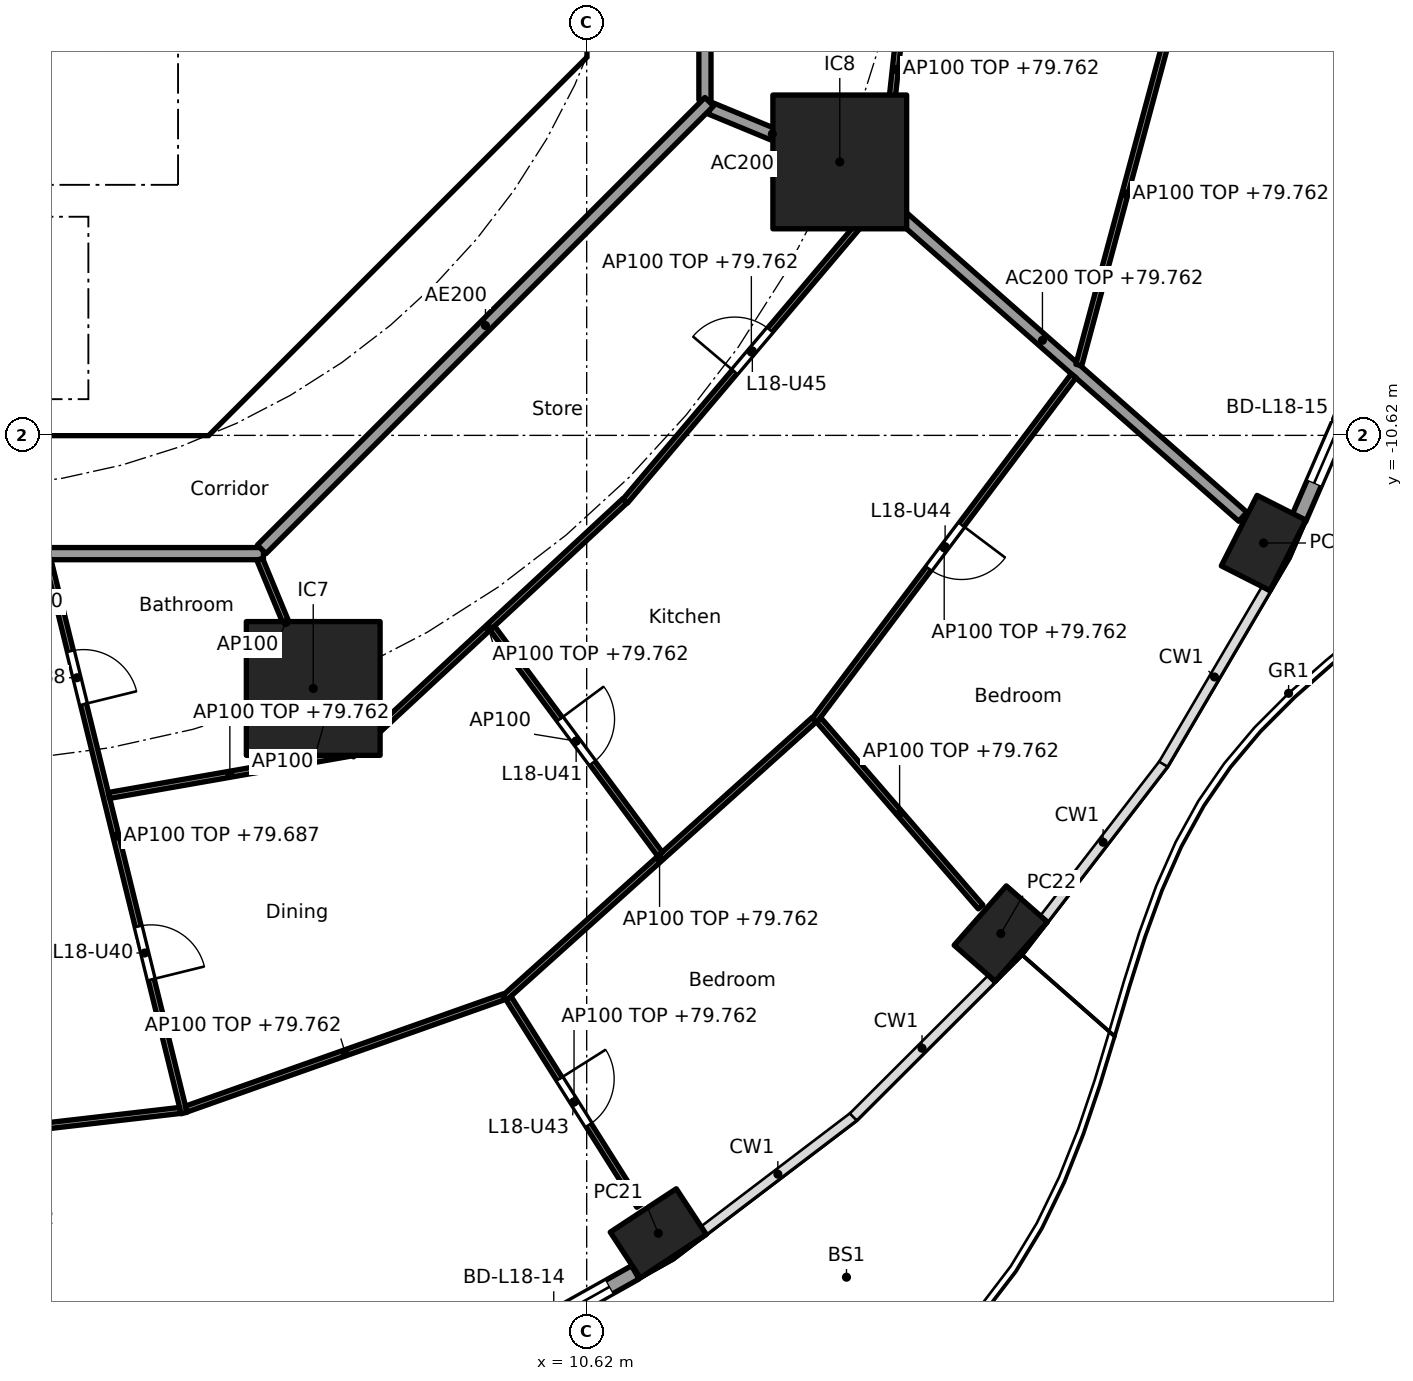
"""IFC4 building model, lengths in metres.
Left out: names, types, materials, properties, quantities, classifications, styles, units other than length and angle.
Written with IfcOpenShell. Run it as: python <this file> out.ifc"""

import sys

from ifc_helpers import new_model, si_unit, direction, frame, frame_2d, origin, origin_2d, place, context, subcontext, project, spatial, polyline, rectangle, hollow_rectangle, outline, extrude, element, fill, save


model = new_model("IFC4")
c1 = context("Model", 3, precision=1e-05, world=origin(), true_north=direction((0.0, 1.0)))
c2 = subcontext(c1, "Body", "Model", "MODEL_VIEW")
j1 = project(units=[si_unit("LENGTHUNIT", "METRE"), si_unit("PLANEANGLEUNIT", "RADIAN")], contexts=[c1])
p1 = place(None, origin())
s1 = spatial("IfcSite", under=j1, at=p1, CompositionType="ELEMENT")
p2 = place(p1, origin())
s2 = spatial("IfcBuilding", under=s1, at=p2, CompositionType="ELEMENT")
p3 = place(p2, frame((0.0, 0.0, 77.0)))
s3 = spatial("IfcBuildingStorey", under=s2, at=p3, CompositionType="ELEMENT", Elevation=77.0)
for number, where, z_axis, x_axis in (
    (1, (11.798, -23.742, 0.0), (0.0, 0.0, 1.0), (0.836, 0.549, 0.0)),
    (2, (17.43, -18.813, 0.0), (0.0, 0.0, 1.0), (0.66, 0.751, 0.0)),
    (3, (21.751, -12.39, 0.0), (0.0, 0.0, 1.0), (0.452, 0.892, 0.0)),
):
    element("IfcColumn", number, at=place(p3, frame(where, z_axis=z_axis, x_axis=x_axis)), inside=s3, PredefinedType="COLUMN", context=c2, shape_type="SweptSolid", body=[
        extrude(hollow_rectangle(XDim=1.3, YDim=0.9, WallThickness=0.045, at=origin_2d()), origin(), (0.0, 0.0, 1.0), 3.7),
    ])
for number, where, z_axis, x_axis in (
    (4, (6.123, -14.782, 0.0), (0.0, 0.0, 1.0), (1.0, 0.0, 0.0)),
    (5, (14.782, -6.123, 0.0), (0.0, 0.0, 1.0), (1.0, 0.0, 0.0)),
):
    element("IfcColumn", number, at=place(p3, frame(where, z_axis=z_axis, x_axis=x_axis)), inside=s3, PredefinedType="COLUMN", context=c2, shape_type="SweptSolid", body=[
        extrude(rectangle(XDim=2.2, YDim=2.2, at=origin_2d()), origin(), (0.0, 0.0, 1.0), 3.7),
    ])
p4 = place(p3, frame((11.419, -24.384, 0.0), z_axis=(0.0, 0.0, 1.0), x_axis=(-0.872071158476, -0.489379090843, 0.0)))
e6 = element("IfcWall", 6, at=p4, inside=s3, PredefinedType="SOLIDWALL", context=c2, shape_type="SweptSolid", body=[
    extrude(rectangle(XDim=3.076, YDim=0.25, at=frame_2d((1.538, 0.0))), origin(), (0.0, 0.0, 1.0), 3.44),
])
p5 = place(p4, frame((0.488, 0.0, 0.0)))
e7 = element("IfcOpeningElement", 7, at=p5, cuts=e6, PredefinedType="OPENING", context=c2, shape_type="SweptSolid", body=[
    extrude(rectangle(XDim=2.1, YDim=2.4, at=frame_2d((1.05, 1.2))), frame((0.0, 0.135, 0.0), z_axis=(0.0, -1.0, 0.0), x_axis=(1.0, 0.0, 0.0)), (0.0, 0.0, 1.0), 0.27),
])
p6 = place(p3, frame((23.672, -8.893, 0.0), z_axis=(0.0, 0.0, 1.0), x_axis=(-0.397621629246, -0.917549475481, 0.0)))
e8 = element("IfcWall", 8, at=p6, inside=s3, PredefinedType="SOLIDWALL", context=c2, shape_type="SweptSolid", body=[
    extrude(rectangle(XDim=3.379, YDim=0.25, at=frame_2d((1.69, 0.0))), origin(), (0.0, 0.0, 1.0), 3.44),
])
p7 = place(p6, frame((0.64, 0.0, 0.0)))
e9 = element("IfcOpeningElement", 9, at=p7, cuts=e8, PredefinedType="OPENING", context=c2, shape_type="SweptSolid", body=[
    extrude(rectangle(XDim=2.1, YDim=2.4, at=frame_2d((1.05, 1.2))), frame((0.0, 0.135, 0.0), z_axis=(0.0, -1.0, 0.0), x_axis=(1.0, 0.0, 0.0)), (0.0, 0.0, 1.0), 0.27),
])
p8 = place(p3, frame((4.613, -9.988, 0.0), z_axis=(0.0, 0.0, 1.0), x_axis=(0.707106781187, 0.707106781187, 0.0)))
e10 = element("IfcWall", 10, at=p8, inside=s3, PredefinedType="SHEAR", context=c2, shape_type="SweptSolid", body=[
    extrude(rectangle(XDim=7.602, YDim=0.6, at=frame_2d((3.801, 0.0))), origin(), (0.0, 0.0, 1.0), 3.44),
])
p9 = place(p8, frame((3.201, 0.0, 0.0)))
e11 = element("IfcOpeningElement", 11, at=p9, cuts=e10, PredefinedType="OPENING", context=c2, shape_type="SweptSolid", body=[
    extrude(rectangle(XDim=1.2, YDim=2.1, at=frame_2d((0.6, 1.05))), frame((0.0, 0.31, 0.0), z_axis=(0.0, -1.0, 0.0), x_axis=(1.0, 0.0, 0.0)), (0.0, 0.0, 1.0), 0.62),
])
p10 = place(p3, frame((4.0, -10.025, 0.0), z_axis=(0.0, 0.0, 1.0), x_axis=(0.0, 1.0, 0.0)))
e12 = element("IfcWall", 12, at=p10, inside=s3, PredefinedType="SOLIDWALL", context=c2, shape_type="SweptSolid", body=[
    extrude(rectangle(XDim=3.0, YDim=0.2, at=frame_2d((1.5, 0.0))), origin(), (0.0, 0.0, 1.0), 3.44),
])
p11 = place(p10, frame((0.975, 0.0, 0.0)))
e13 = element("IfcOpeningElement", 13, at=p11, cuts=e12, PredefinedType="OPENING", context=c2, shape_type="SweptSolid", body=[
    extrude(rectangle(XDim=1.1, YDim=2.1, at=frame_2d((0.55, 1.05))), frame((0.0, 0.11, 0.0), z_axis=(0.0, -1.0, 0.0), x_axis=(1.0, 0.0, 0.0)), (0.0, 0.0, 1.0), 0.22),
])
p12 = place(p3, frame((4.0, -6.5, 0.0), z_axis=(0.0, 0.0, 1.0), x_axis=(0.0, 1.0, 0.0)))
e14 = element("IfcWall", 14, at=p12, inside=s3, PredefinedType="SOLIDWALL", context=c2, shape_type="SweptSolid", body=[
    extrude(rectangle(XDim=2.2, YDim=0.2, at=frame_2d((1.1, 0.0))), origin(), (0.0, 0.0, 1.0), 3.44),
])
p13 = place(p12, frame((0.55, 0.0, 0.0)))
e15 = element("IfcOpeningElement", 15, at=p13, cuts=e14, PredefinedType="OPENING", context=c2, shape_type="SweptSolid", body=[
    extrude(rectangle(XDim=1.1, YDim=2.1, at=frame_2d((0.55, 1.05))), frame((0.0, 0.11, 0.0), z_axis=(0.0, -1.0, 0.0), x_axis=(1.0, 0.0, 0.0)), (0.0, 0.0, 1.0), 0.22),
])
p14 = place(p3, origin())
e16 = element("IfcWall", 16, at=p14, inside=s3, PredefinedType="SHEAR", context=c2, shape_type="SweptSolid", body=[
    extrude(outline(polyline([(-4.152, -10.025), (4.152, -10.025), (4.401, -9.776), (4.825, -10.2), (4.401, -10.625), (-4.401, -10.625), (-4.825, -10.2), (-4.401, -9.776), (-4.152, -10.025)])), origin(), (0.0, 0.0, 1.0), 3.44),
])
p15 = place(p3, origin())
e17 = element("IfcWall", 17, at=p15, inside=s3, PredefinedType="SHEAR", context=c2, shape_type="SweptSolid", body=[
    extrude(outline(polyline([(9.776, -4.401), (10.025, -4.152), (10.025, -3.801), (10.025, 4.152), (9.776, 4.401), (10.2, 4.825), (10.625, 4.401), (10.625, -4.401), (10.2, -4.825), (9.776, -4.401)])), origin(), (0.0, 0.0, 1.0), 3.44),
])
p16 = place(p3, origin())
e18 = element("IfcWall", 18, at=p16, inside=s3, PredefinedType="SOLIDWALL", context=c2, shape_type="SweptSolid", body=[
    extrude(outline(polyline([(4.1, -7.025), (-4.1, -7.025), (-4.1, -6.5), (4.1, -6.5), (4.1, -7.025)])), origin(), (0.0, 0.0, 1.0), 3.44),
])
p17 = place(p3, frame((12.657, -5.243, 0.0), z_axis=(0.0, 0.0, 1.0), x_axis=(0.923876145736, -0.382691608661, 0.0)))
e19 = element("IfcWall", 19, at=p17, inside=s3, PredefinedType="PARTITIONING", context=c2, shape_type="SweptSolid", body=[
    extrude(rectangle(XDim=2.2, YDim=0.2, at=frame_2d((1.1, 0.0))), origin(), (0.0, 0.0, 1.0), 3.44),
])
p18 = place(p3, frame((14.82, -6.156, 0.0), z_axis=(0.0, 0.0, 1.0), x_axis=(0.750582231659, -0.660777052808, 0.0)))
e20 = element("IfcWall", 20, at=p18, inside=s3, PredefinedType="PARTITIONING", context=c2, shape_type="SweptSolid", body=[
    extrude(rectangle(XDim=8.781, YDim=0.2, at=frame_2d((4.391, 0.0))), origin(), (0.0, 0.0, 1.0), 2.762),
])
p19 = place(p3, frame((12.565, -5.104, 0.0), z_axis=(0.0, 0.0, 1.0), x_axis=(0.0, 1.0, 0.0)))
e21 = element("IfcWall", 21, at=p19, inside=s3, PredefinedType="PARTITIONING", context=c2, shape_type="SweptSolid", body=[
    extrude(rectangle(XDim=10.209, YDim=0.2, at=frame_2d((5.104, 0.0))), origin(), (0.0, 0.0, 1.0), 3.44),
])
p20 = place(p19, frame((6.339, 0.0, 0.0)))
e22 = element("IfcOpeningElement", 22, at=p20, cuts=e21, PredefinedType="OPENING", context=c2, shape_type="SweptSolid", body=[
    extrude(rectangle(XDim=1.0, YDim=2.1, at=frame_2d((0.5, 1.05))), frame((0.0, 0.11, 0.0), z_axis=(0.0, -1.0, 0.0), x_axis=(1.0, 0.0, 0.0)), (0.0, 0.0, 1.0), 0.22),
])
p21 = place(p3, frame((-5.104, -12.565, 0.0), z_axis=(0.0, 0.0, 1.0), x_axis=(1.0, 0.0, 0.0)))
e23 = element("IfcWall", 23, at=p21, inside=s3, PredefinedType="PARTITIONING", context=c2, shape_type="SweptSolid", body=[
    extrude(rectangle(XDim=10.409, YDim=0.2, at=frame_2d((5.205, 0.0))), origin(), (0.0, 0.0, 1.0), 3.44),
])
p22 = place(p21, frame((4.604, 0.0, 0.0)))
e24 = element("IfcOpeningElement", 24, at=p22, cuts=e23, PredefinedType="OPENING", context=c2, shape_type="SweptSolid", body=[
    extrude(rectangle(XDim=1.0, YDim=2.1, at=frame_2d((0.5, 1.05))), frame((0.0, 0.11, 0.0), z_axis=(0.0, -1.0, 0.0), x_axis=(1.0, 0.0, 0.0)), (0.0, 0.0, 1.0), 0.22),
])
p23 = place(p3, frame((5.275, -12.494, 0.0), z_axis=(0.0, 0.0, 1.0), x_axis=(0.707106781187, 0.707106781187, 0.0)))
e25 = element("IfcWall", 25, at=p23, inside=s3, PredefinedType="PARTITIONING", context=c2, shape_type="SweptSolid", body=[
    extrude(rectangle(XDim=10.409, YDim=0.2, at=frame_2d((5.205, 0.0))), origin(), (0.0, 0.0, 1.0), 3.44),
])
p24 = place(p3, frame((-1.726, -22.375, 0.0), z_axis=(0.0, 0.0, 1.0), x_axis=(0.99339223329, 0.114768771187, 0.0)))
e26 = element("IfcWall", 26, at=p24, inside=s3, PredefinedType="PARTITIONING", context=c2, shape_type="SweptSolid", body=[
    extrude(rectangle(XDim=5.701, YDim=0.1, at=frame_2d((2.851, 0.0))), origin(), (0.0, 0.0, 1.0), 2.762),
])
p25 = place(p24, frame((2.4, 0.0, 0.0)))
e27 = element("IfcOpeningElement", 27, at=p25, cuts=e26, PredefinedType="OPENING", context=c2, shape_type="SweptSolid", body=[
    extrude(rectangle(XDim=0.9, YDim=2.1, at=frame_2d((0.45, 1.05))), frame((0.0, 0.06, 0.0), z_axis=(0.0, -1.0, 0.0), x_axis=(1.0, 0.0, 0.0)), (0.0, 0.0, 1.0), 0.12),
])
p26 = place(p3, frame((1.759, -12.662, 0.0), z_axis=(0.0, 0.0, 1.0), x_axis=(0.239022447434, -0.971014041929, 0.0)))
e28 = element("IfcWall", 28, at=p26, inside=s3, PredefinedType="PARTITIONING", context=c2, shape_type="SweptSolid", body=[
    extrude(rectangle(XDim=9.374, YDim=0.1, at=frame_2d((4.687, 0.0))), origin(), (0.0, 0.0, 1.0), 2.687),
])
p27 = place(p26, frame((1.552, 0.0, 0.0)))
e29 = element("IfcOpeningElement", 29, at=p27, cuts=e28, PredefinedType="OPENING", context=c2, shape_type="SweptSolid", body=[
    extrude(rectangle(XDim=0.9, YDim=2.1, at=frame_2d((0.45, 1.05))), frame((0.0, 0.06, 0.0), z_axis=(0.0, -1.0, 0.0), x_axis=(1.0, 0.0, 0.0)), (0.0, 0.0, 1.0), 0.12),
])
p28 = place(p26, frame((6.214, 0.0, 0.0)))
e30 = element("IfcOpeningElement", 30, at=p28, cuts=e28, PredefinedType="OPENING", context=c2, shape_type="SweptSolid", body=[
    extrude(rectangle(XDim=0.9, YDim=2.1, at=frame_2d((0.45, 1.05))), frame((0.0, 0.06, 0.0), z_axis=(0.0, -1.0, 0.0), x_axis=(1.0, 0.0, 0.0)), (0.0, 0.0, 1.0), 0.12),
])
p29 = place(p3, frame((2.765, -16.541, 0.0), z_axis=(0.0, 0.0, 1.0), x_axis=(0.985002709003, 0.172538874623, 0.0)))
e31 = element("IfcWall", 31, at=p29, inside=s3, PredefinedType="PARTITIONING", context=c2, shape_type="SweptSolid", body=[
    extrude(rectangle(XDim=4.034, YDim=0.1, at=frame_2d((2.017, 0.0))), origin(), (0.0, 0.0, 1.0), 2.762),
])
p30 = place(p3, frame((4.034, -21.698, 0.0), z_axis=(0.0, 0.0, 1.0), x_axis=(0.942864271692, 0.333177077794, 0.0)))
e32 = element("IfcWall", 32, at=p30, inside=s3, PredefinedType="PARTITIONING", context=c2, shape_type="SweptSolid", body=[
    extrude(rectangle(XDim=5.545, YDim=0.1, at=frame_2d((2.772, 0.0))), origin(), (0.0, 0.0, 1.0), 2.762),
])
p31 = place(p3, frame((5.243, -12.657, 0.0), z_axis=(0.0, 0.0, 1.0), x_axis=(0.382719158442, -0.923864733477, 0.0)))
e33 = element("IfcWall", 33, at=p31, inside=s3, PredefinedType="PARTITIONING", context=c2, shape_type="SweptSolid", body=[
    extrude(rectangle(XDim=2.25, YDim=0.1, at=frame_2d((1.125, 0.0))), origin(), (0.0, 0.0, 1.0), 3.44),
])
p32 = place(p3, frame((6.751, -15.87, 0.0), z_axis=(0.0, 0.0, 1.0), x_axis=(0.733003105791, 0.680225291283, 0.0)))
e34 = element("IfcWall", 34, at=p32, inside=s3, PredefinedType="PARTITIONING", context=c2, shape_type="SweptSolid", body=[
    extrude(rectangle(XDim=6.138, YDim=0.1, at=frame_2d((3.069, 0.0))), origin(), (0.0, 0.0, 1.0), 2.762),
])
p33 = place(p3, frame((9.336, -19.877, 0.0), z_axis=(0.0, 0.0, 1.0), x_axis=(0.533525984139, -0.845783674617, 0.0)))
e35 = element("IfcWall", 35, at=p33, inside=s3, PredefinedType="PARTITIONING", context=c2, shape_type="SweptSolid", body=[
    extrude(rectangle(XDim=4.033, YDim=0.1, at=frame_2d((2.016, 0.0))), origin(), (0.0, 0.0, 1.0), 2.762),
])
p34 = place(p33, frame((1.566, 0.0, 0.0)))
e36 = element("IfcOpeningElement", 36, at=p34, cuts=e35, PredefinedType="OPENING", context=c2, shape_type="SweptSolid", body=[
    extrude(rectangle(XDim=0.9, YDim=2.1, at=frame_2d((0.45, 1.05))), frame((0.0, 0.06, 0.0), z_axis=(0.0, -1.0, 0.0), x_axis=(1.0, 0.0, 0.0)), (0.0, 0.0, 1.0), 0.12),
])
p35 = place(p3, frame((9.272, -19.868, 0.0), z_axis=(0.0, 0.0, 1.0), x_axis=(0.743884413566, 0.668308296562, 0.0)))
e37 = element("IfcWall", 37, at=p35, inside=s3, PredefinedType="PARTITIONING", context=c2, shape_type="SweptSolid", body=[
    extrude(rectangle(XDim=6.845, YDim=0.1, at=frame_2d((3.423, 0.0))), origin(), (0.0, 0.0, 1.0), 2.762),
])
p36 = place(p3, frame((9.067, -13.789, 0.0), z_axis=(0.0, 0.0, 1.0), x_axis=(0.5958491185, -0.80309640018, 0.0)))
e38 = element("IfcWall", 38, at=p36, inside=s3, PredefinedType="PARTITIONING", context=c2, shape_type="SweptSolid", body=[
    extrude(rectangle(XDim=4.63, YDim=0.1, at=frame_2d((2.315, 0.0))), origin(), (0.0, 0.0, 1.0), 3.44),
])
p37 = place(p36, frame((1.865, 0.0, 0.0)))
e39 = element("IfcOpeningElement", 39, at=p37, cuts=e38, PredefinedType="OPENING", context=c2, shape_type="SweptSolid", body=[
    extrude(rectangle(XDim=0.9, YDim=2.1, at=frame_2d((0.45, 1.05))), frame((0.0, 0.06, 0.0), z_axis=(0.0, -1.0, 0.0), x_axis=(1.0, 0.0, 0.0)), (0.0, 0.0, 1.0), 0.12),
])
p38 = place(p3, frame((11.255, -11.699, 0.0), z_axis=(0.0, 0.0, 1.0), x_axis=(0.646107653745, 0.763246290375, 0.0)))
e40 = element("IfcWall", 40, at=p38, inside=s3, PredefinedType="PARTITIONING", context=c2, shape_type="SweptSolid", body=[
    extrude(rectangle(XDim=6.417, YDim=0.1, at=frame_2d((3.208, 0.0))), origin(), (0.0, 0.0, 1.0), 2.762),
])
p39 = place(p38, frame((2.784, 0.0, 0.0)))
e41 = element("IfcOpeningElement", 41, at=p39, cuts=e40, PredefinedType="OPENING", context=c2, shape_type="SweptSolid", body=[
    extrude(rectangle(XDim=0.9, YDim=2.1, at=frame_2d((0.45, 1.05))), frame((0.0, 0.06, 0.0), z_axis=(0.0, -1.0, 0.0), x_axis=(1.0, 0.0, 0.0)), (0.0, 0.0, 1.0), 0.12),
])
p40 = place(p3, frame((14.435, -15.297, 0.0), z_axis=(0.0, 0.0, 1.0), x_axis=(0.654405107766, -0.756144136345, 0.0)))
e42 = element("IfcWall", 42, at=p40, inside=s3, PredefinedType="PARTITIONING", context=c2, shape_type="SweptSolid", body=[
    extrude(rectangle(XDim=4.07, YDim=0.1, at=frame_2d((2.035, 0.0))), origin(), (0.0, 0.0, 1.0), 2.762),
])
p41 = place(p3, frame((14.372, -15.3, 0.0), z_axis=(0.0, 0.0, 1.0), x_axis=(0.600987107857, 0.79925871668, 0.0)))
e43 = element("IfcWall", 43, at=p41, inside=s3, PredefinedType="PARTITIONING", context=c2, shape_type="SweptSolid", body=[
    extrude(rectangle(XDim=7.08, YDim=0.1, at=frame_2d((3.54, 0.0))), origin(), (0.0, 0.0, 1.0), 2.762),
])
p42 = place(p41, frame((3.115, 0.0, 0.0)))
e44 = element("IfcOpeningElement", 44, at=p42, cuts=e43, PredefinedType="OPENING", context=c2, shape_type="SweptSolid", body=[
    extrude(rectangle(XDim=0.9, YDim=2.1, at=frame_2d((0.45, 1.05))), frame((0.0, 0.06, 0.0), z_axis=(0.0, -1.0, 0.0), x_axis=(1.0, 0.0, 0.0)), (0.0, 0.0, 1.0), 0.12),
])
p43 = place(p3, frame((15.477, -6.625, 0.0), z_axis=(0.0, 0.0, 1.0), x_axis=(0.107561928907, 0.994198386365, 0.0)))
e45 = element("IfcWall", 45, at=p43, inside=s3, PredefinedType="PARTITIONING", context=c2, shape_type="SweptSolid", body=[
    extrude(rectangle(XDim=4.072, YDim=0.1, at=frame_2d((2.036, 0.0))), origin(), (0.0, 0.0, 1.0), 2.762),
])
p44 = place(p3, frame((18.713, -9.464, 0.0), z_axis=(0.0, 0.0, 1.0), x_axis=(0.260279646259, 0.965533275316, 0.0)))
e46 = element("IfcWall", 46, at=p44, inside=s3, PredefinedType="PARTITIONING", context=c2, shape_type="SweptSolid", body=[
    extrude(rectangle(XDim=5.833, YDim=0.1, at=frame_2d((2.917, 0.0))), origin(), (0.0, 0.0, 1.0), 2.762),
])
p45 = place(p3, frame((6.051, -14.855, 0.0), z_axis=(0.0, 0.0, 1.0), x_axis=(0.533542828537, -0.845773048824, 0.0)))
e47 = element("IfcWall", 47, at=p45, inside=s3, PredefinedType="PARTITIONING", context=c2, shape_type="SweptSolid", body=[
    extrude(rectangle(XDim=1.021, YDim=0.1, at=frame_2d((0.51, 0.0))), origin(), (0.0, 0.0, 1.0), 3.44),
])
p46 = place(p5, origin())
e48 = element("IfcDoor", 48, at=p46, inside=s3, OperationType="SLIDING_TO_LEFT", PredefinedType="DOOR", context=c2, shape_type="SweptSolid", body=[
    extrude(rectangle(XDim=2.1, YDim=2.4, at=frame_2d((1.05, 1.2))), frame((0.0, 0.025, 0.0), z_axis=(0.0, -1.0, 0.0), x_axis=(1.0, 0.0, 0.0)), (0.0, 0.0, 1.0), 0.05),
])
fill(e7, e48)
p47 = place(p7, origin())
e49 = element("IfcDoor", 49, at=p47, inside=s3, OperationType="SLIDING_TO_LEFT", PredefinedType="DOOR", context=c2, shape_type="SweptSolid", body=[
    extrude(rectangle(XDim=2.1, YDim=2.4, at=frame_2d((1.05, 1.2))), frame((0.0, 0.025, 0.0), z_axis=(0.0, -1.0, 0.0), x_axis=(1.0, 0.0, 0.0)), (0.0, 0.0, 1.0), 0.05),
])
fill(e9, e49)
p48 = place(p13, origin())
e50 = element("IfcDoor", 50, at=p48, inside=s3, OperationType="DOUBLE_DOOR_SLIDING", PredefinedType="DOOR", context=c2, shape_type="SweptSolid", body=[
    extrude(rectangle(XDim=1.1, YDim=2.1, at=frame_2d((0.55, 1.05))), frame((0.0, 0.025, 0.0), z_axis=(0.0, -1.0, 0.0), x_axis=(1.0, 0.0, 0.0)), (0.0, 0.0, 1.0), 0.05),
])
fill(e15, e50)
p49 = place(p11, origin())
e51 = element("IfcDoor", 51, at=p49, inside=s3, OperationType="SINGLE_SWING_LEFT", PredefinedType="DOOR", context=c2, shape_type="SweptSolid", body=[
    extrude(rectangle(XDim=1.1, YDim=2.1, at=frame_2d((0.55, 1.05))), frame((0.0, 0.025, 0.0), z_axis=(0.0, -1.0, 0.0), x_axis=(1.0, 0.0, 0.0)), (0.0, 0.0, 1.0), 0.05),
])
fill(e13, e51)
p50 = place(p9, origin())
e52 = element("IfcDoor", 52, at=p50, inside=s3, OperationType="SINGLE_SWING_LEFT", PredefinedType="DOOR", context=c2, shape_type="SweptSolid", body=[
    extrude(rectangle(XDim=1.2, YDim=2.1, at=frame_2d((0.6, 1.05))), frame((0.0, 0.025, 0.0), z_axis=(0.0, -1.0, 0.0), x_axis=(1.0, 0.0, 0.0)), (0.0, 0.0, 1.0), 0.05),
])
fill(e11, e52)
p51 = place(p27, origin())
e53 = element("IfcDoor", 53, at=p51, inside=s3, OperationType="SINGLE_SWING_RIGHT", PredefinedType="DOOR", context=c2, shape_type="SweptSolid", body=[
    extrude(rectangle(XDim=0.9, YDim=2.1, at=frame_2d((0.45, 1.05))), frame((0.0, 0.025, 0.0), z_axis=(0.0, -1.0, 0.0), x_axis=(1.0, 0.0, 0.0)), (0.0, 0.0, 1.0), 0.05),
])
fill(e29, e53)
p52 = place(p28, origin())
e54 = element("IfcDoor", 54, at=p52, inside=s3, OperationType="SINGLE_SWING_RIGHT", PredefinedType="DOOR", context=c2, shape_type="SweptSolid", body=[
    extrude(rectangle(XDim=0.9, YDim=2.1, at=frame_2d((0.45, 1.05))), frame((0.0, 0.025, 0.0), z_axis=(0.0, -1.0, 0.0), x_axis=(1.0, 0.0, 0.0)), (0.0, 0.0, 1.0), 0.05),
])
fill(e30, e54)
p53 = place(p37, origin())
e55 = element("IfcDoor", 55, at=p53, inside=s3, OperationType="SINGLE_SWING_LEFT", PredefinedType="DOOR", context=c2, shape_type="SweptSolid", body=[
    extrude(rectangle(XDim=0.9, YDim=2.1, at=frame_2d((0.45, 1.05))), frame((0.0, 0.025, 0.0), z_axis=(0.0, -1.0, 0.0), x_axis=(1.0, 0.0, 0.0)), (0.0, 0.0, 1.0), 0.05),
])
fill(e39, e55)
p54 = place(p34, origin())
e56 = element("IfcDoor", 56, at=p54, inside=s3, OperationType="SINGLE_SWING_LEFT", PredefinedType="DOOR", context=c2, shape_type="SweptSolid", body=[
    extrude(rectangle(XDim=0.9, YDim=2.1, at=frame_2d((0.45, 1.05))), frame((0.0, 0.025, 0.0), z_axis=(0.0, -1.0, 0.0), x_axis=(1.0, 0.0, 0.0)), (0.0, 0.0, 1.0), 0.05),
])
fill(e36, e56)
p55 = place(p42, frame((0.9, 0.0, 0.0), x_axis=(-1.0, 0.0, 0.0)))
e57 = element("IfcDoor", 57, at=p55, inside=s3, OperationType="SINGLE_SWING_LEFT", PredefinedType="DOOR", context=c2, shape_type="SweptSolid", body=[
    extrude(rectangle(XDim=0.9, YDim=2.1, at=frame_2d((0.45, 1.05))), frame((0.0, 0.025, 0.0), z_axis=(0.0, -1.0, 0.0), x_axis=(1.0, 0.0, 0.0)), (0.0, 0.0, 1.0), 0.05),
])
fill(e44, e57)
p56 = place(p39, origin())
e58 = element("IfcDoor", 58, at=p56, inside=s3, OperationType="SINGLE_SWING_LEFT", PredefinedType="DOOR", context=c2, shape_type="SweptSolid", body=[
    extrude(rectangle(XDim=0.9, YDim=2.1, at=frame_2d((0.45, 1.05))), frame((0.0, 0.025, 0.0), z_axis=(0.0, -1.0, 0.0), x_axis=(1.0, 0.0, 0.0)), (0.0, 0.0, 1.0), 0.05),
])
fill(e41, e58)
save(model, sys.argv[1])
